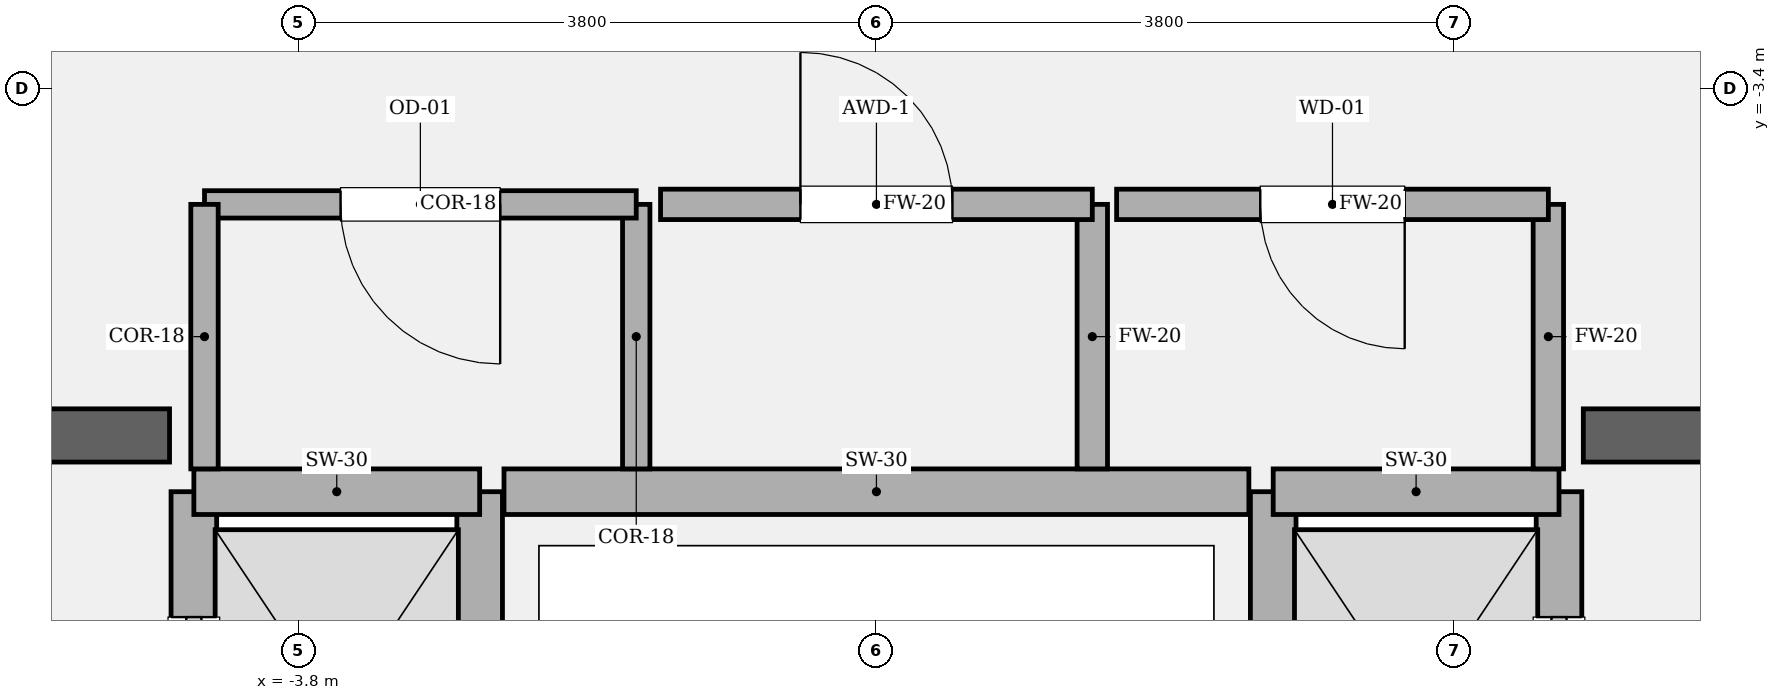
"""IFC4 building model, lengths in metres.
Left out: names, types, materials, properties, quantities, classifications, styles, units other than length and angle.
Written with IfcOpenShell. Run it as: python <this file> out.ifc"""

import sys

from ifc_helpers import new_model, si_unit, direction, frame, frame_2d, origin, place, context, subcontext, project, spatial, rectangle, extrude, element, fill, save


model = new_model("IFC4")
c1 = context("Model", 3, precision=1e-05, world=origin(), true_north=direction((0.0, 1.0)))
c2 = subcontext(c1, "Body", "Model", "MODEL_VIEW")
j1 = project(units=[si_unit("LENGTHUNIT", "METRE"), si_unit("PLANEANGLEUNIT", "RADIAN")], contexts=[c1])
p1 = place(None, origin())
s1 = spatial("IfcSite", under=j1, at=p1, CompositionType="ELEMENT")
p2 = place(p1, origin())
s2 = spatial("IfcBuilding", under=s1, at=p2, CompositionType="ELEMENT")
p3 = place(p2, frame((0.0, 0.0, 48.45)))
s3 = spatial("IfcBuildingStorey", under=s2, at=p3, CompositionType="ELEMENT", Elevation=48.45)
p4 = place(p3, frame((-9.825, -5.68, 0.0), z_axis=(0.0, 0.0, 1.0), x_axis=(1.0, 0.0, 0.0)))
e1 = element("IfcWall", 1, at=p4, inside=s3, PredefinedType="SOLIDWALL", context=c2, shape_type="SweptSolid", body=[
    extrude(rectangle(XDim=5.175, YDim=0.35, at=frame_2d((2.587, 0.0))), origin(), (0.0, 0.0, 1.0), 4.05),
])
p5 = place(p4, frame((1.285, 0.0, 0.0)))
e2 = element("IfcOpeningElement", 2, at=p5, cuts=e1, PredefinedType="OPENING", context=c2, shape_type="SweptSolid", body=[
    extrude(rectangle(XDim=1.18, YDim=2.2, at=frame_2d((0.59, 1.1))), frame((0.0, 0.185, 0.0), z_axis=(0.0, -1.0, 0.0), x_axis=(1.0, 0.0, 0.0)), (0.0, 0.0, 1.0), 0.37),
])
p6 = place(p3, frame((4.65, -5.68, 0.0), z_axis=(0.0, 0.0, 1.0), x_axis=(1.0, 0.0, 0.0)))
e3 = element("IfcWall", 3, at=p6, inside=s3, PredefinedType="SOLIDWALL", context=c2, shape_type="SweptSolid", body=[
    extrude(rectangle(XDim=5.175, YDim=0.35, at=frame_2d((2.587, 0.0))), origin(), (0.0, 0.0, 1.0), 4.05),
])
p7 = place(p6, frame((2.71, 0.0, 0.0)))
e4 = element("IfcOpeningElement", 4, at=p7, cuts=e3, PredefinedType="OPENING", context=c2, shape_type="SweptSolid", body=[
    extrude(rectangle(XDim=1.18, YDim=2.2, at=frame_2d((0.59, 1.1))), frame((0.0, 0.185, 0.0), z_axis=(0.0, -1.0, 0.0), x_axis=(1.0, 0.0, 0.0)), (0.0, 0.0, 1.0), 0.37),
])
p8 = place(p3, frame((-4.49, -8.82, 0.0), z_axis=(0.0, 0.0, 1.0), x_axis=(0.0, 1.0, 0.0)))
e5 = element("IfcWall", 5, at=p8, inside=s3, PredefinedType="SOLIDWALL", context=c2, shape_type="SweptSolid", body=[
    extrude(rectangle(XDim=2.77, YDim=0.3, at=frame_2d((1.385, 0.0))), origin(), (0.0, 0.0, 1.0), 3.81),
])
p9 = place(p8, frame((0.825, 0.0, 0.0)))
e6 = element("IfcOpeningElement", 6, at=p9, cuts=e5, PredefinedType="OPENING", context=c2, shape_type="SweptSolid", body=[
    extrude(rectangle(XDim=1.12, YDim=2.25, at=frame_2d((0.56, 1.125))), frame((0.0, 0.16, 0.0), z_axis=(0.0, -1.0, 0.0), x_axis=(1.0, 0.0, 0.0)), (0.0, 0.0, 1.0), 0.32),
])
p10 = place(p3, frame((-2.61, -8.82, 0.0), z_axis=(0.0, 0.0, 1.0), x_axis=(0.0, 1.0, 0.0)))
e7 = element("IfcWall", 7, at=p10, inside=s3, PredefinedType="SOLIDWALL", context=c2, shape_type="SweptSolid", body=[
    extrude(rectangle(XDim=2.77, YDim=0.3, at=frame_2d((1.385, 0.0))), origin(), (0.0, 0.0, 1.0), 3.81),
])
p11 = place(p3, frame((-4.49, -6.05, 0.0), z_axis=(0.0, 0.0, 1.0), x_axis=(1.0, 0.0, 0.0)))
e8 = element("IfcWall", 8, at=p11, inside=s3, PredefinedType="SOLIDWALL", context=c2, shape_type="SweptSolid", body=[
    extrude(rectangle(XDim=1.88, YDim=0.3, at=frame_2d((0.94, 0.0))), origin(), (0.0, 0.0, 1.0), 3.81),
])
p12 = place(p3, frame((4.49, -8.82, 0.0), z_axis=(0.0, 0.0, 1.0), x_axis=(0.0, 1.0, 0.0)))
e9 = element("IfcWall", 9, at=p12, inside=s3, PredefinedType="SOLIDWALL", context=c2, shape_type="SweptSolid", body=[
    extrude(rectangle(XDim=2.77, YDim=0.3, at=frame_2d((1.385, 0.0))), origin(), (0.0, 0.0, 1.0), 3.81),
])
p13 = place(p12, frame((0.825, 0.0, 0.0)))
e10 = element("IfcOpeningElement", 10, at=p13, cuts=e9, PredefinedType="OPENING", context=c2, shape_type="SweptSolid", body=[
    extrude(rectangle(XDim=1.12, YDim=2.25, at=frame_2d((0.56, 1.125))), frame((0.0, 0.16, 0.0), z_axis=(0.0, -1.0, 0.0), x_axis=(1.0, 0.0, 0.0)), (0.0, 0.0, 1.0), 0.32),
])
p14 = place(p3, frame((2.61, -8.82, 0.0), z_axis=(0.0, 0.0, 1.0), x_axis=(0.0, 1.0, 0.0)))
e11 = element("IfcWall", 11, at=p14, inside=s3, PredefinedType="SOLIDWALL", context=c2, shape_type="SweptSolid", body=[
    extrude(rectangle(XDim=2.77, YDim=0.3, at=frame_2d((1.385, 0.0))), origin(), (0.0, 0.0, 1.0), 3.81),
])
p15 = place(p3, frame((2.61, -6.05, 0.0), z_axis=(0.0, 0.0, 1.0), x_axis=(1.0, 0.0, 0.0)))
e12 = element("IfcWall", 12, at=p15, inside=s3, PredefinedType="SOLIDWALL", context=c2, shape_type="SweptSolid", body=[
    extrude(rectangle(XDim=1.88, YDim=0.3, at=frame_2d((0.94, 0.0))), origin(), (0.0, 0.0, 1.0), 3.81),
])
p16 = place(p3, frame((-2.45, -6.05, 0.0), z_axis=(0.0, 0.0, 1.0), x_axis=(1.0, 0.0, 0.0)))
e13 = element("IfcWall", 13, at=p16, inside=s3, PredefinedType="SOLIDWALL", context=c2, shape_type="SweptSolid", body=[
    extrude(rectangle(XDim=4.9, YDim=0.3, at=frame_2d((2.45, 0.0))), origin(), (0.0, 0.0, 1.0), 3.81),
])
p17 = place(p3, frame((-1.58, -5.9, 0.0), z_axis=(0.0, 0.0, 1.0), x_axis=(0.0, 1.0, 0.0)))
e14 = element("IfcWall", 14, at=p17, inside=s3, PredefinedType="PARTITIONING", context=c2, shape_type="SweptSolid", body=[
    extrude(rectangle(XDim=1.74, YDim=0.18, at=frame_2d((0.87, 0.0))), origin(), (0.0, 0.0, 1.0), 3.81),
])
p18 = place(p3, frame((-1.58, -4.16, 0.0), z_axis=(0.0, 0.0, 1.0), x_axis=(-1.0, 0.0, 0.0)))
e15 = element("IfcWall", 15, at=p18, inside=s3, PredefinedType="PARTITIONING", context=c2, shape_type="SweptSolid", body=[
    extrude(rectangle(XDim=2.84, YDim=0.18, at=frame_2d((1.42, 0.0))), origin(), (0.0, 0.0, 1.0), 3.81),
])
p19 = place(p18, frame((0.895, 0.0, 0.0)))
e16 = element("IfcOpeningElement", 16, at=p19, cuts=e15, PredefinedType="OPENING", context=c2, shape_type="SweptSolid", body=[
    extrude(rectangle(XDim=1.05, YDim=2.2, at=frame_2d((0.525, 1.1))), frame((0.0, 0.1, 0.0), z_axis=(0.0, -1.0, 0.0), x_axis=(1.0, 0.0, 0.0)), (0.0, 0.0, 1.0), 0.2),
])
p20 = place(p3, frame((-4.42, -4.16, 0.0), z_axis=(0.0, 0.0, 1.0), x_axis=(0.0, -1.0, 0.0)))
e17 = element("IfcWall", 17, at=p20, inside=s3, PredefinedType="PARTITIONING", context=c2, shape_type="SweptSolid", body=[
    extrude(rectangle(XDim=1.74, YDim=0.18, at=frame_2d((0.87, 0.0))), origin(), (0.0, 0.0, 1.0), 3.81),
])
p21 = place(p3, frame((1.42, -5.9, 0.0), z_axis=(0.0, 0.0, 1.0), x_axis=(0.0, 1.0, 0.0)))
e18 = element("IfcWall", 18, at=p21, inside=s3, PredefinedType="SOLIDWALL", context=c2, shape_type="SweptSolid", body=[
    extrude(rectangle(XDim=1.74, YDim=0.2, at=frame_2d((0.87, 0.0))), origin(), (0.0, 0.0, 1.0), 3.81),
])
p22 = place(p3, frame((1.42, -4.16, 0.0), z_axis=(0.0, 0.0, 1.0), x_axis=(-1.0, 0.0, 0.0)))
e19 = element("IfcWall", 19, at=p22, inside=s3, PredefinedType="SOLIDWALL", context=c2, shape_type="SweptSolid", body=[
    extrude(rectangle(XDim=2.84, YDim=0.2, at=frame_2d((1.42, 0.0))), origin(), (0.0, 0.0, 1.0), 3.81),
])
p23 = place(p22, frame((0.92, 0.0, 0.0)))
e20 = element("IfcOpeningElement", 20, at=p23, cuts=e19, PredefinedType="OPENING", context=c2, shape_type="SweptSolid", body=[
    extrude(rectangle(XDim=1.0, YDim=2.15, at=frame_2d((0.5, 1.075))), frame((0.0, 0.11, 0.0), z_axis=(0.0, -1.0, 0.0), x_axis=(1.0, 0.0, 0.0)), (0.0, 0.0, 1.0), 0.22),
])
p24 = place(p3, frame((4.42, -5.9, 0.0), z_axis=(0.0, 0.0, 1.0), x_axis=(0.0, 1.0, 0.0)))
e21 = element("IfcWall", 21, at=p24, inside=s3, PredefinedType="SOLIDWALL", context=c2, shape_type="SweptSolid", body=[
    extrude(rectangle(XDim=1.74, YDim=0.2, at=frame_2d((0.87, 0.0))), origin(), (0.0, 0.0, 1.0), 3.81),
])
p25 = place(p3, frame((4.42, -4.16, 0.0), z_axis=(0.0, 0.0, 1.0), x_axis=(-1.0, 0.0, 0.0)))
e22 = element("IfcWall", 22, at=p25, inside=s3, PredefinedType="SOLIDWALL", context=c2, shape_type="SweptSolid", body=[
    extrude(rectangle(XDim=2.84, YDim=0.2, at=frame_2d((1.42, 0.0))), origin(), (0.0, 0.0, 1.0), 3.81),
])
p26 = place(p25, frame((0.945, 0.0, 0.0)))
e23 = element("IfcOpeningElement", 23, at=p26, cuts=e22, PredefinedType="OPENING", context=c2, shape_type="SweptSolid", body=[
    extrude(rectangle(XDim=0.95, YDim=2.15, at=frame_2d((0.475, 1.075))), frame((0.0, 0.11, 0.0), z_axis=(0.0, -1.0, 0.0), x_axis=(1.0, 0.0, 0.0)), (0.0, 0.0, 1.0), 0.22),
])
p27 = place(p9, origin())
e24 = element("IfcDoor", 24, at=p27, inside=s3, OperationType="SLIDING_TO_LEFT", PredefinedType="DOOR", context=c2, shape_type="SweptSolid", body=[
    extrude(rectangle(XDim=1.12, YDim=2.25, at=frame_2d((0.56, 1.125))), frame((0.0, 0.025, 0.0), z_axis=(0.0, -1.0, 0.0), x_axis=(1.0, 0.0, 0.0)), (0.0, 0.0, 1.0), 0.05),
])
fill(e6, e24)
p28 = place(p13, origin())
e25 = element("IfcDoor", 25, at=p28, inside=s3, OperationType="SLIDING_TO_RIGHT", PredefinedType="DOOR", context=c2, shape_type="SweptSolid", body=[
    extrude(rectangle(XDim=1.12, YDim=2.25, at=frame_2d((0.56, 1.125))), frame((0.0, 0.025, 0.0), z_axis=(0.0, -1.0, 0.0), x_axis=(1.0, 0.0, 0.0)), (0.0, 0.0, 1.0), 0.05),
])
fill(e10, e25)
p29 = place(p19, origin())
e26 = element("IfcDoor", 26, at=p29, inside=s3, OperationType="SINGLE_SWING_LEFT", PredefinedType="DOOR", context=c2, shape_type="SweptSolid", body=[
    extrude(rectangle(XDim=1.05, YDim=2.2, at=frame_2d((0.525, 1.1))), frame((0.0, 0.025, 0.0), z_axis=(0.0, -1.0, 0.0), x_axis=(1.0, 0.0, 0.0)), (0.0, 0.0, 1.0), 0.05),
])
fill(e16, e26)
p30 = place(p23, origin())
e27 = element("IfcDoor", 27, at=p30, inside=s3, OperationType="SINGLE_SWING_RIGHT", PredefinedType="DOOR", context=c2, shape_type="SweptSolid", body=[
    extrude(rectangle(XDim=1.0, YDim=2.15, at=frame_2d((0.5, 1.075))), frame((0.0, 0.025, 0.0), z_axis=(0.0, -1.0, 0.0), x_axis=(1.0, 0.0, 0.0)), (0.0, 0.0, 1.0), 0.05),
])
fill(e20, e27)
p31 = place(p26, origin())
e28 = element("IfcDoor", 28, at=p31, inside=s3, OperationType="SINGLE_SWING_LEFT", PredefinedType="DOOR", context=c2, shape_type="SweptSolid", body=[
    extrude(rectangle(XDim=0.95, YDim=2.15, at=frame_2d((0.475, 1.075))), frame((0.0, 0.025, 0.0), z_axis=(0.0, -1.0, 0.0), x_axis=(1.0, 0.0, 0.0)), (0.0, 0.0, 1.0), 0.05),
])
fill(e23, e28)
save(model, sys.argv[1])
